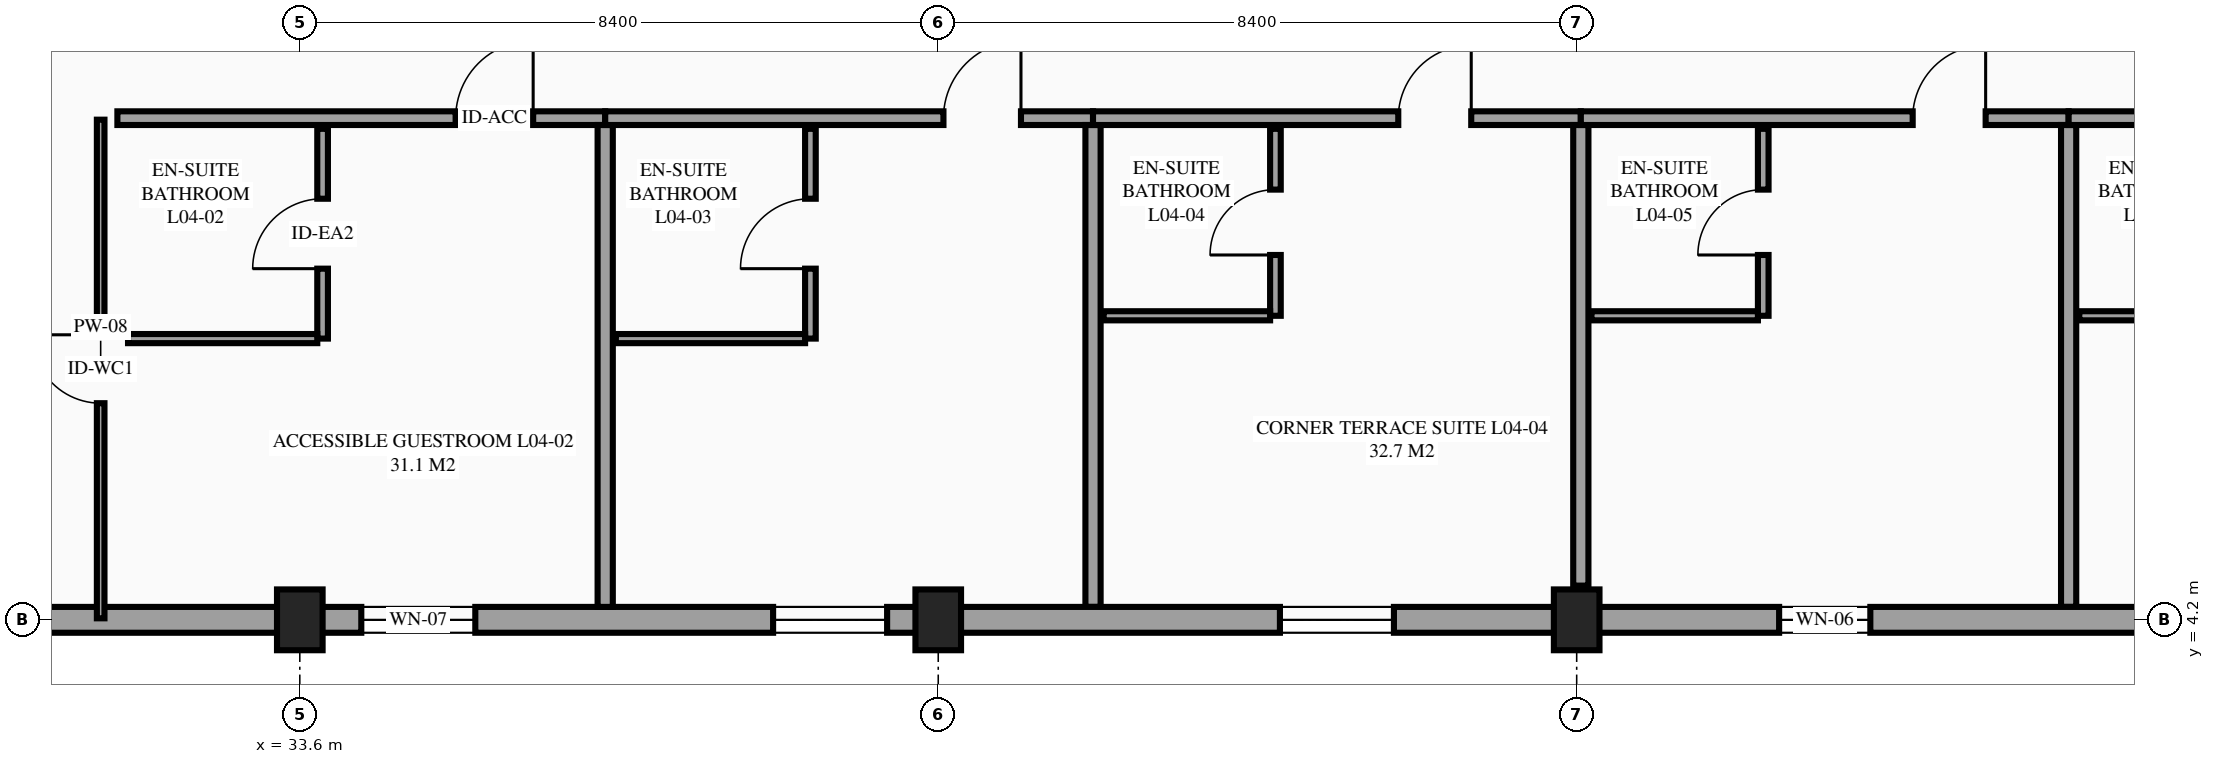
"""IFC4 building model, lengths in metres.
Left out: names, types, materials, properties, quantities, classifications, styles, units other than length and angle.
Written with IfcOpenShell. Run it as: python <this file> out.ifc"""

import sys

from ifc_helpers import new_model, si_unit, direction, frame, frame_2d, origin, origin_2d, place, context, subcontext, project, spatial, rectangle, extrude, element, fill, save


model = new_model("IFC4")
c1 = context("Model", 3, precision=1e-05, world=origin(), true_north=direction((0.0, 1.0)))
c2 = subcontext(c1, "Body", "Model", "MODEL_VIEW")
j1 = project(units=[si_unit("LENGTHUNIT", "METRE"), si_unit("PLANEANGLEUNIT", "RADIAN")], contexts=[c1])
p1 = place(None, origin())
s1 = spatial("IfcSite", under=j1, at=p1, CompositionType="ELEMENT")
p2 = place(p1, origin())
s2 = spatial("IfcBuilding", under=s1, at=p2, CompositionType="ELEMENT")
p3 = place(p2, frame((0.0, 0.0, 18.3)))
s3 = spatial("IfcBuildingStorey", under=s2, at=p3, CompositionType="ELEMENT", Elevation=18.3)
for number, where, z_axis, x_axis in (
    (1, (33.6, 4.2, 0.0), (0.0, 0.0, 1.0), (1.0, 0.0, 0.0)),
    (2, (42.0, 4.2, 0.0), (0.0, 0.0, 1.0), (1.0, 0.0, 0.0)),
    (3, (50.4, 4.2, 0.0), (0.0, 0.0, 1.0), (1.0, 0.0, 0.0)),
):
    element("IfcColumn", number, at=place(p3, frame(where, z_axis=z_axis, x_axis=x_axis)), inside=s3, PredefinedType="COLUMN", context=c2, shape_type="SweptSolid", body=[
        extrude(rectangle(XDim=0.6, YDim=0.8, at=origin_2d()), origin(), (0.0, 0.0, 1.0), 3.6),
    ])
p4 = place(p3, frame((25.2, 4.2, 0.0), z_axis=(0.0, 0.0, 1.0), x_axis=(1.0, 0.0, 0.0)))
e4 = element("IfcWall", 4, at=p4, inside=s3, PredefinedType="STANDARD", context=c2, shape_type="SweptSolid", body=[
    extrude(rectangle(XDim=16.8, YDim=0.34, at=frame_2d((8.4, 0.0))), origin(), (0.0, 0.0, 1.0), 2.63),
])
p5 = place(p4, frame((9.209, 0.0, 0.85)))
e5 = element("IfcOpeningElement", 5, at=p5, cuts=e4, PredefinedType="OPENING", context=c2, shape_type="SweptSolid", body=[
    extrude(rectangle(XDim=1.5, YDim=1.5, at=frame_2d((0.75, 0.75))), frame((0.0, 0.18, 0.0), z_axis=(0.0, -1.0, 0.0), x_axis=(1.0, 0.0, 0.0)), (0.0, 0.0, 1.0), 0.36),
])
p6 = place(p4, frame((14.627, 0.0, 0.85)))
e6 = element("IfcOpeningElement", 6, at=p6, cuts=e4, PredefinedType="OPENING", context=c2, shape_type="SweptSolid", body=[
    extrude(rectangle(XDim=1.5, YDim=1.5, at=frame_2d((0.75, 0.75))), frame((0.0, 0.18, 0.0), z_axis=(0.0, -1.0, 0.0), x_axis=(1.0, 0.0, 0.0)), (0.0, 0.0, 1.0), 0.36),
])
p7 = place(p4, frame((2.25, 0.0, 0.75)))
e7 = element("IfcOpeningElement", 7, at=p7, cuts=e4, PredefinedType="OPENING", context=c2, shape_type="SweptSolid", body=[
    extrude(rectangle(XDim=2.1, YDim=1.5, at=frame_2d((1.05, 0.75))), frame((0.0, 0.18, 0.0), z_axis=(0.0, -1.0, 0.0), x_axis=(1.0, 0.0, 0.0)), (0.0, 0.0, 1.0), 0.36),
])
p8 = place(p3, frame((31.2, 10.8, 0.0), z_axis=(0.0, 0.0, 1.0), x_axis=(1.0, 0.0, 0.0)))
e8 = element("IfcWall", 8, at=p8, inside=s3, PredefinedType="PARTITIONING", context=c2, shape_type="SweptSolid", body=[
    extrude(rectangle(XDim=6.418, YDim=0.18, at=frame_2d((3.209, 0.0))), origin(), (0.0, 0.0, 1.0), 3.375),
])
p9 = place(p8, frame((4.45, 0.0, 0.0)))
e9 = element("IfcOpeningElement", 9, at=p9, cuts=e8, PredefinedType="OPENING", context=c2, shape_type="SweptSolid", body=[
    extrude(rectangle(XDim=1.02, YDim=2.15, at=frame_2d((0.51, 1.075))), frame((0.0, 0.1, 0.0), z_axis=(0.0, -1.0, 0.0), x_axis=(1.0, 0.0, 0.0)), (0.0, 0.0, 1.0), 0.2),
])
p10 = place(p3, frame((37.618, 4.37, 0.0), z_axis=(0.0, 0.0, 1.0), x_axis=(0.0, 1.0, 0.0)))
e10 = element("IfcWall", 10, at=p10, inside=s3, PredefinedType="PARTITIONING", context=c2, shape_type="SweptSolid", body=[
    extrude(rectangle(XDim=6.34, YDim=0.2, at=frame_2d((3.17, 0.0))), origin(), (0.0, 0.0, 1.0), 3.375),
])
p11 = place(p3, frame((33.9, 7.9, 0.0), z_axis=(0.0, 0.0, 1.0), x_axis=(0.0, 1.0, 0.0)))
e11 = element("IfcWall", 11, at=p11, inside=s3, PredefinedType="PARTITIONING", context=c2, shape_type="SweptSolid", body=[
    extrude(rectangle(XDim=2.76, YDim=0.14, at=frame_2d((1.38, 0.0))), origin(), (0.0, 0.0, 1.0), 3.375),
])
p12 = place(p11, frame((0.92, 0.0, 0.0)))
e12 = element("IfcOpeningElement", 12, at=p12, cuts=e11, PredefinedType="OPENING", context=c2, shape_type="SweptSolid", body=[
    extrude(rectangle(XDim=0.92, YDim=2.1, at=frame_2d((0.46, 1.05))), frame((0.0, 0.08, 0.0), z_axis=(0.0, -1.0, 0.0), x_axis=(1.0, 0.0, 0.0)), (0.0, 0.0, 1.0), 0.16),
])
p13 = place(p3, frame((31.34, 7.9, 0.0), z_axis=(0.0, 0.0, 1.0), x_axis=(1.0, 0.0, 0.0)))
e13 = element("IfcWall", 13, at=p13, inside=s3, PredefinedType="PARTITIONING", context=c2, shape_type="SweptSolid", body=[
    extrude(rectangle(XDim=2.49, YDim=0.12, at=frame_2d((1.245, 0.0))), origin(), (0.0, 0.0, 1.0), 3.375),
])
p14 = place(p3, frame((37.618, 10.8, 0.0), z_axis=(0.0, 0.0, 1.0), x_axis=(1.0, 0.0, 0.0)))
e14 = element("IfcWall", 14, at=p14, inside=s3, PredefinedType="PARTITIONING", context=c2, shape_type="SweptSolid", body=[
    extrude(rectangle(XDim=6.418, YDim=0.18, at=frame_2d((3.209, 0.0))), origin(), (0.0, 0.0, 1.0), 3.375),
])
p15 = place(p14, frame((4.45, 0.0, 0.0)))
e15 = element("IfcOpeningElement", 15, at=p15, cuts=e14, PredefinedType="OPENING", context=c2, shape_type="SweptSolid", body=[
    extrude(rectangle(XDim=1.02, YDim=2.15, at=frame_2d((0.51, 1.075))), frame((0.0, 0.1, 0.0), z_axis=(0.0, -1.0, 0.0), x_axis=(1.0, 0.0, 0.0)), (0.0, 0.0, 1.0), 0.2),
])
p16 = place(p3, frame((44.036, 4.37, 0.0), z_axis=(0.0, 0.0, 1.0), x_axis=(0.0, 1.0, 0.0)))
e16 = element("IfcWall", 16, at=p16, inside=s3, PredefinedType="PARTITIONING", context=c2, shape_type="SweptSolid", body=[
    extrude(rectangle(XDim=6.34, YDim=0.2, at=frame_2d((3.17, 0.0))), origin(), (0.0, 0.0, 1.0), 3.375),
])
p17 = place(p3, frame((40.318, 7.9, 0.0), z_axis=(0.0, 0.0, 1.0), x_axis=(0.0, 1.0, 0.0)))
e17 = element("IfcWall", 17, at=p17, inside=s3, PredefinedType="PARTITIONING", context=c2, shape_type="SweptSolid", body=[
    extrude(rectangle(XDim=2.76, YDim=0.14, at=frame_2d((1.38, 0.0))), origin(), (0.0, 0.0, 1.0), 3.375),
])
p18 = place(p17, frame((0.92, 0.0, 0.0)))
e18 = element("IfcOpeningElement", 18, at=p18, cuts=e17, PredefinedType="OPENING", context=c2, shape_type="SweptSolid", body=[
    extrude(rectangle(XDim=0.92, YDim=2.1, at=frame_2d((0.46, 1.05))), frame((0.0, 0.08, 0.0), z_axis=(0.0, -1.0, 0.0), x_axis=(1.0, 0.0, 0.0)), (0.0, 0.0, 1.0), 0.16),
])
p19 = place(p3, frame((37.758, 7.9, 0.0), z_axis=(0.0, 0.0, 1.0), x_axis=(1.0, 0.0, 0.0)))
e19 = element("IfcWall", 19, at=p19, inside=s3, PredefinedType="PARTITIONING", context=c2, shape_type="SweptSolid", body=[
    extrude(rectangle(XDim=2.49, YDim=0.12, at=frame_2d((1.245, 0.0))), origin(), (0.0, 0.0, 1.0), 3.375),
])
p20 = place(p3, frame((44.036, 10.8, 0.0), z_axis=(0.0, 0.0, 1.0), x_axis=(1.0, 0.0, 0.0)))
e20 = element("IfcWall", 20, at=p20, inside=s3, PredefinedType="PARTITIONING", context=c2, shape_type="SweptSolid", body=[
    extrude(rectangle(XDim=6.418, YDim=0.18, at=frame_2d((3.209, 0.0))), origin(), (0.0, 0.0, 1.0), 3.375),
])
p21 = place(p20, frame((4.016, 0.0, 0.0)))
e21 = element("IfcOpeningElement", 21, at=p21, cuts=e20, PredefinedType="OPENING", context=c2, shape_type="SweptSolid", body=[
    extrude(rectangle(XDim=0.96, YDim=2.15, at=frame_2d((0.48, 1.075))), frame((0.0, 0.1, 0.0), z_axis=(0.0, -1.0, 0.0), x_axis=(1.0, 0.0, 0.0)), (0.0, 0.0, 1.0), 0.2),
])
p22 = place(p3, frame((50.455, 4.65, 0.0), z_axis=(0.0, 0.0, 1.0), x_axis=(0.0, 1.0, 0.0)))
e22 = element("IfcWall", 22, at=p22, inside=s3, PredefinedType="PARTITIONING", context=c2, shape_type="SweptSolid", body=[
    extrude(rectangle(XDim=6.06, YDim=0.2, at=frame_2d((3.03, 0.0))), origin(), (0.0, 0.0, 1.0), 3.126),
])
p23 = place(p3, frame((46.436, 8.2, 0.0), z_axis=(0.0, 0.0, 1.0), x_axis=(0.0, 1.0, 0.0)))
e23 = element("IfcWall", 23, at=p23, inside=s3, PredefinedType="PARTITIONING", context=c2, shape_type="SweptSolid", body=[
    extrude(rectangle(XDim=2.46, YDim=0.14, at=frame_2d((1.23, 0.0))), origin(), (0.0, 0.0, 1.0), 3.375),
])
p24 = place(p23, frame((0.8, 0.0, 0.0)))
e24 = element("IfcOpeningElement", 24, at=p24, cuts=e23, PredefinedType="OPENING", context=c2, shape_type="SweptSolid", body=[
    extrude(rectangle(XDim=0.86, YDim=2.1, at=frame_2d((0.43, 1.05))), frame((0.0, 0.08, 0.0), z_axis=(0.0, -1.0, 0.0), x_axis=(1.0, 0.0, 0.0)), (0.0, 0.0, 1.0), 0.16),
])
p25 = place(p3, frame((44.177, 8.2, 0.0), z_axis=(0.0, 0.0, 1.0), x_axis=(1.0, 0.0, 0.0)))
e25 = element("IfcWall", 25, at=p25, inside=s3, PredefinedType="PARTITIONING", context=c2, shape_type="SweptSolid", body=[
    extrude(rectangle(XDim=2.19, YDim=0.12, at=frame_2d((1.095, 0.0))), origin(), (0.0, 0.0, 1.0), 3.375),
])
p26 = place(p3, frame((50.455, 10.8, 0.0), z_axis=(0.0, 0.0, 1.0), x_axis=(1.0, 0.0, 0.0)))
e26 = element("IfcWall", 26, at=p26, inside=s3, PredefinedType="PARTITIONING", context=c2, shape_type="SweptSolid", body=[
    extrude(rectangle(XDim=6.418, YDim=0.18, at=frame_2d((3.209, 0.0))), origin(), (0.0, 0.0, 1.0), 3.375),
])
p27 = place(p26, frame((4.366, 0.0, 0.0)))
e27 = element("IfcOpeningElement", 27, at=p27, cuts=e26, PredefinedType="OPENING", context=c2, shape_type="SweptSolid", body=[
    extrude(rectangle(XDim=0.96, YDim=2.15, at=frame_2d((0.48, 1.075))), frame((0.0, 0.1, 0.0), z_axis=(0.0, -1.0, 0.0), x_axis=(1.0, 0.0, 0.0)), (0.0, 0.0, 1.0), 0.2),
])
p28 = place(p3, frame((56.873, 4.37, 0.0), z_axis=(0.0, 0.0, 1.0), x_axis=(0.0, 1.0, 0.0)))
e28 = element("IfcWall", 28, at=p28, inside=s3, PredefinedType="PARTITIONING", context=c2, shape_type="SweptSolid", body=[
    extrude(rectangle(XDim=6.34, YDim=0.2, at=frame_2d((3.17, 0.0))), origin(), (0.0, 0.0, 1.0), 3.375),
])
p29 = place(p3, frame((52.854, 8.2, 0.0), z_axis=(0.0, 0.0, 1.0), x_axis=(0.0, 1.0, 0.0)))
e29 = element("IfcWall", 29, at=p29, inside=s3, PredefinedType="PARTITIONING", context=c2, shape_type="SweptSolid", body=[
    extrude(rectangle(XDim=2.46, YDim=0.14, at=frame_2d((1.23, 0.0))), origin(), (0.0, 0.0, 1.0), 3.375),
])
p30 = place(p29, frame((0.8, 0.0, 0.0)))
e30 = element("IfcOpeningElement", 30, at=p30, cuts=e29, PredefinedType="OPENING", context=c2, shape_type="SweptSolid", body=[
    extrude(rectangle(XDim=0.86, YDim=2.1, at=frame_2d((0.43, 1.05))), frame((0.0, 0.08, 0.0), z_axis=(0.0, -1.0, 0.0), x_axis=(1.0, 0.0, 0.0)), (0.0, 0.0, 1.0), 0.16),
])
p31 = place(p3, frame((50.594, 8.2, 0.0), z_axis=(0.0, 0.0, 1.0), x_axis=(1.0, 0.0, 0.0)))
e31 = element("IfcWall", 31, at=p31, inside=s3, PredefinedType="PARTITIONING", context=c2, shape_type="SweptSolid", body=[
    extrude(rectangle(XDim=2.19, YDim=0.12, at=frame_2d((1.095, 0.0))), origin(), (0.0, 0.0, 1.0), 3.375),
])
p32 = place(p3, frame((56.873, 10.8, 0.0), z_axis=(0.0, 0.0, 1.0), x_axis=(1.0, 0.0, 0.0)))
e32 = element("IfcWall", 32, at=p32, inside=s3, PredefinedType="PARTITIONING", context=c2, shape_type="SweptSolid", body=[
    extrude(rectangle(XDim=6.418, YDim=0.18, at=frame_2d((3.209, 0.0))), origin(), (0.0, 0.0, 1.0), 3.375),
])
p33 = place(p32, frame((4.366, 0.0, 0.0)))
e33 = element("IfcOpeningElement", 33, at=p33, cuts=e32, PredefinedType="OPENING", context=c2, shape_type="SweptSolid", body=[
    extrude(rectangle(XDim=0.96, YDim=2.15, at=frame_2d((0.48, 1.075))), frame((0.0, 0.1, 0.0), z_axis=(0.0, -1.0, 0.0), x_axis=(1.0, 0.0, 0.0)), (0.0, 0.0, 1.0), 0.2),
])
p34 = place(p3, frame((57.013, 8.2, 0.0), z_axis=(0.0, 0.0, 1.0), x_axis=(1.0, 0.0, 0.0)))
e34 = element("IfcWall", 34, at=p34, inside=s3, PredefinedType="PARTITIONING", context=c2, shape_type="SweptSolid", body=[
    extrude(rectangle(XDim=2.19, YDim=0.12, at=frame_2d((1.095, 0.0))), origin(), (0.0, 0.0, 1.0), 3.375),
])
p35 = place(p3, frame((30.98, 4.22, 0.0), z_axis=(0.0, 0.0, 1.0), x_axis=(0.0, 1.0, 0.0)))
e35 = element("IfcWall", 35, at=p35, inside=s3, PredefinedType="PARTITIONING", context=c2, shape_type="SweptSolid", body=[
    extrude(rectangle(XDim=6.56, YDim=0.1, at=frame_2d((3.28, 0.0))), origin(), (0.0, 0.0, 1.0), 3.375),
])
p36 = place(p35, frame((2.83, 0.0, 0.0)))
e36 = element("IfcOpeningElement", 36, at=p36, cuts=e35, PredefinedType="OPENING", context=c2, shape_type="SweptSolid", body=[
    extrude(rectangle(XDim=0.9, YDim=2.12, at=frame_2d((0.45, 1.06))), frame((0.0, 0.06, 0.0), z_axis=(0.0, -1.0, 0.0), x_axis=(1.0, 0.0, 0.0)), (0.0, 0.0, 1.0), 0.12),
])
p37 = place(p3, frame((42.0, 4.2, 0.0), z_axis=(0.0, 0.0, 1.0), x_axis=(1.0, 0.0, 0.0)))
e37 = element("IfcWall", 37, at=p37, inside=s3, PredefinedType="STANDARD", context=c2, shape_type="SweptSolid", body=[
    extrude(rectangle(XDim=8.4, YDim=0.34, at=frame_2d((4.2, 0.0))), origin(), (0.0, 0.0, 1.0), 3.133),
])
p38 = place(p37, frame((4.496, 0.0, 0.85)))
e38 = element("IfcOpeningElement", 38, at=p38, cuts=e37, PredefinedType="OPENING", context=c2, shape_type="SweptSolid", body=[
    extrude(rectangle(XDim=1.5, YDim=1.5, at=frame_2d((0.75, 0.75))), frame((0.0, 0.18, 0.0), z_axis=(0.0, -1.0, 0.0), x_axis=(1.0, 0.0, 0.0)), (0.0, 0.0, 1.0), 0.36),
])
p39 = place(p3, frame((50.4, 4.2, 0.0), z_axis=(0.0, 0.0, 1.0), x_axis=(1.0, 0.0, 0.0)))
e39 = element("IfcWall", 39, at=p39, inside=s3, PredefinedType="STANDARD", context=c2, shape_type="SweptSolid", body=[
    extrude(rectangle(XDim=8.4, YDim=0.34, at=frame_2d((4.2, 0.0))), origin(), (0.0, 0.0, 1.0), 2.68),
])
p40 = place(p39, frame((2.664, 0.0, 0.85)))
e40 = element("IfcOpeningElement", 40, at=p40, cuts=e39, PredefinedType="OPENING", context=c2, shape_type="SweptSolid", body=[
    extrude(rectangle(XDim=1.2, YDim=1.5, at=frame_2d((0.6, 0.75))), frame((0.0, 0.18, 0.0), z_axis=(0.0, -1.0, 0.0), x_axis=(1.0, 0.0, 0.0)), (0.0, 0.0, 1.0), 0.36),
])
p41 = place(p5, origin())
e41 = element("IfcWindow", 41, at=p41, inside=s3, PartitioningType="SINGLE_PANEL", PredefinedType="WINDOW", context=c2, shape_type="SweptSolid", body=[
    extrude(rectangle(XDim=1.5, YDim=1.5, at=frame_2d((0.75, 0.75))), frame((0.0, 0.03, 0.0), z_axis=(0.0, -1.0, 0.0), x_axis=(1.0, 0.0, 0.0)), (0.0, 0.0, 1.0), 0.06),
])
fill(e5, e41)
p42 = place(p6, origin())
e42 = element("IfcWindow", 42, at=p42, inside=s3, PartitioningType="SINGLE_PANEL", PredefinedType="WINDOW", context=c2, shape_type="SweptSolid", body=[
    extrude(rectangle(XDim=1.5, YDim=1.5, at=frame_2d((0.75, 0.75))), frame((0.0, 0.03, 0.0), z_axis=(0.0, -1.0, 0.0), x_axis=(1.0, 0.0, 0.0)), (0.0, 0.0, 1.0), 0.06),
])
fill(e6, e42)
p43 = place(p38, origin())
e43 = element("IfcWindow", 43, at=p43, inside=s3, PartitioningType="SINGLE_PANEL", PredefinedType="WINDOW", context=c2, shape_type="SweptSolid", body=[
    extrude(rectangle(XDim=1.5, YDim=1.5, at=frame_2d((0.75, 0.75))), frame((0.0, 0.03, 0.0), z_axis=(0.0, -1.0, 0.0), x_axis=(1.0, 0.0, 0.0)), (0.0, 0.0, 1.0), 0.06),
])
fill(e38, e43)
p44 = place(p40, origin())
e44 = element("IfcWindow", 44, at=p44, inside=s3, PartitioningType="SINGLE_PANEL", PredefinedType="WINDOW", context=c2, shape_type="SweptSolid", body=[
    extrude(rectangle(XDim=1.2, YDim=1.5, at=frame_2d((0.6, 0.75))), frame((0.0, 0.03, 0.0), z_axis=(0.0, -1.0, 0.0), x_axis=(1.0, 0.0, 0.0)), (0.0, 0.0, 1.0), 0.06),
])
fill(e40, e44)
p45 = place(p9, origin())
e45 = element("IfcDoor", 45, at=p45, inside=s3, OperationType="SINGLE_SWING_RIGHT", PredefinedType="DOOR", context=c2, shape_type="SweptSolid", body=[
    extrude(rectangle(XDim=1.02, YDim=2.15, at=frame_2d((0.51, 1.075))), frame((0.0, 0.025, 0.0), z_axis=(0.0, -1.0, 0.0), x_axis=(1.0, 0.0, 0.0)), (0.0, 0.0, 1.0), 0.05),
])
fill(e9, e45)
p46 = place(p12, origin())
e46 = element("IfcDoor", 46, at=p46, inside=s3, OperationType="SINGLE_SWING_LEFT", PredefinedType="DOOR", context=c2, shape_type="SweptSolid", body=[
    extrude(rectangle(XDim=0.92, YDim=2.1, at=frame_2d((0.46, 1.05))), frame((0.0, 0.025, 0.0), z_axis=(0.0, -1.0, 0.0), x_axis=(1.0, 0.0, 0.0)), (0.0, 0.0, 1.0), 0.05),
])
fill(e12, e46)
p47 = place(p15, origin())
e47 = element("IfcDoor", 47, at=p47, inside=s3, OperationType="SINGLE_SWING_RIGHT", PredefinedType="DOOR", context=c2, shape_type="SweptSolid", body=[
    extrude(rectangle(XDim=1.02, YDim=2.15, at=frame_2d((0.51, 1.075))), frame((0.0, 0.025, 0.0), z_axis=(0.0, -1.0, 0.0), x_axis=(1.0, 0.0, 0.0)), (0.0, 0.0, 1.0), 0.05),
])
fill(e15, e47)
p48 = place(p18, origin())
e48 = element("IfcDoor", 48, at=p48, inside=s3, OperationType="SINGLE_SWING_LEFT", PredefinedType="DOOR", context=c2, shape_type="SweptSolid", body=[
    extrude(rectangle(XDim=0.92, YDim=2.1, at=frame_2d((0.46, 1.05))), frame((0.0, 0.025, 0.0), z_axis=(0.0, -1.0, 0.0), x_axis=(1.0, 0.0, 0.0)), (0.0, 0.0, 1.0), 0.05),
])
fill(e18, e48)
p49 = place(p21, origin())
e49 = element("IfcDoor", 49, at=p49, inside=s3, OperationType="SINGLE_SWING_RIGHT", PredefinedType="DOOR", context=c2, shape_type="SweptSolid", body=[
    extrude(rectangle(XDim=0.96, YDim=2.15, at=frame_2d((0.48, 1.075))), frame((0.0, 0.025, 0.0), z_axis=(0.0, -1.0, 0.0), x_axis=(1.0, 0.0, 0.0)), (0.0, 0.0, 1.0), 0.05),
])
fill(e21, e49)
p50 = place(p24, origin())
e50 = element("IfcDoor", 50, at=p50, inside=s3, OperationType="SINGLE_SWING_LEFT", PredefinedType="DOOR", context=c2, shape_type="SweptSolid", body=[
    extrude(rectangle(XDim=0.86, YDim=2.1, at=frame_2d((0.43, 1.05))), frame((0.0, 0.025, 0.0), z_axis=(0.0, -1.0, 0.0), x_axis=(1.0, 0.0, 0.0)), (0.0, 0.0, 1.0), 0.05),
])
fill(e24, e50)
p51 = place(p27, origin())
e51 = element("IfcDoor", 51, at=p51, inside=s3, OperationType="SINGLE_SWING_RIGHT", PredefinedType="DOOR", context=c2, shape_type="SweptSolid", body=[
    extrude(rectangle(XDim=0.96, YDim=2.15, at=frame_2d((0.48, 1.075))), frame((0.0, 0.025, 0.0), z_axis=(0.0, -1.0, 0.0), x_axis=(1.0, 0.0, 0.0)), (0.0, 0.0, 1.0), 0.05),
])
fill(e27, e51)
p52 = place(p30, origin())
e52 = element("IfcDoor", 52, at=p52, inside=s3, OperationType="SINGLE_SWING_LEFT", PredefinedType="DOOR", context=c2, shape_type="SweptSolid", body=[
    extrude(rectangle(XDim=0.86, YDim=2.1, at=frame_2d((0.43, 1.05))), frame((0.0, 0.025, 0.0), z_axis=(0.0, -1.0, 0.0), x_axis=(1.0, 0.0, 0.0)), (0.0, 0.0, 1.0), 0.05),
])
fill(e30, e52)
p53 = place(p36, origin())
e53 = element("IfcDoor", 53, at=p53, inside=s3, OperationType="SINGLE_SWING_RIGHT", PredefinedType="DOOR", context=c2, shape_type="SweptSolid", body=[
    extrude(rectangle(XDim=0.9, YDim=2.12, at=frame_2d((0.45, 1.06))), frame((0.0, 0.025, 0.0), z_axis=(0.0, -1.0, 0.0), x_axis=(1.0, 0.0, 0.0)), (0.0, 0.0, 1.0), 0.05),
])
fill(e36, e53)
save(model, sys.argv[1])
